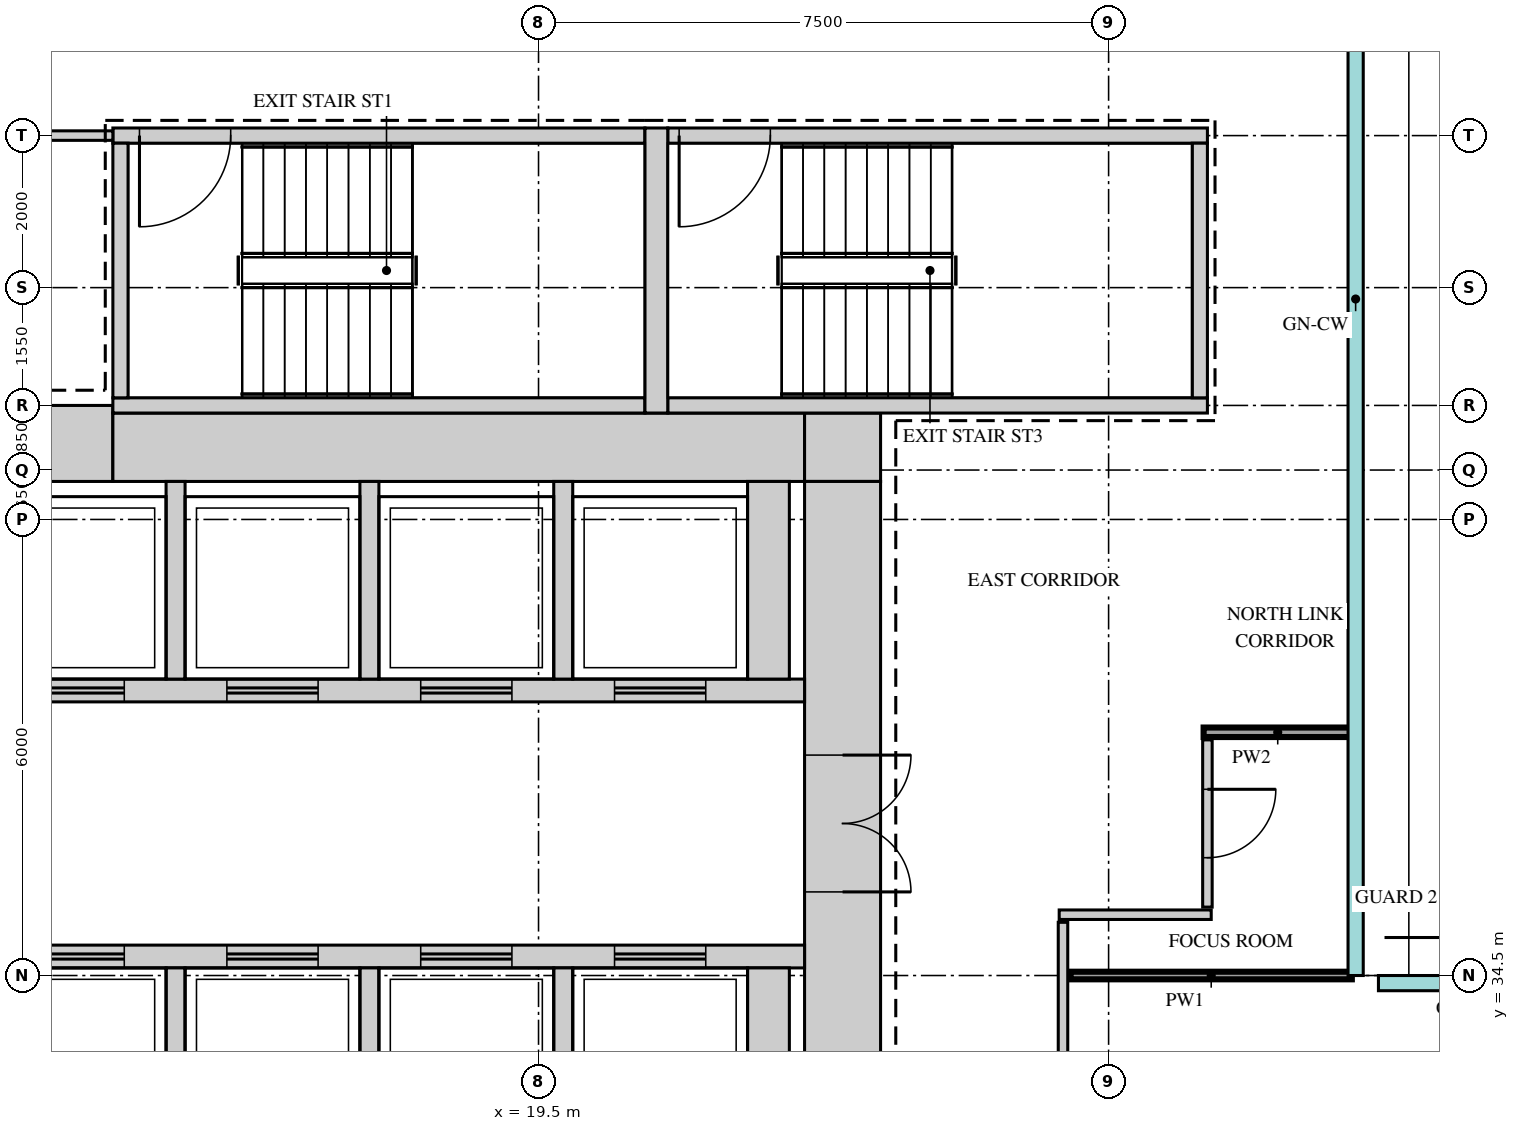
"""IFC4 building model, lengths in metres.
Left out: names, types, materials, properties, quantities, classifications, styles, units other than length and angle.
Written with IfcOpenShell. Run it as: python <this file> out.ifc"""

import sys

from ifc_helpers import new_model, si_unit, direction, frame, frame_2d, origin, place, context, subcontext, project, spatial, rectangle, extrude, source, transform, mapped, element, fill, save


model = new_model("IFC4")
c1 = context("Model", 3, precision=1e-05, world=origin(), true_north=direction((0.0, 1.0)))
c2 = subcontext(c1, "Body", "Model", "MODEL_VIEW")
j1 = project(units=[si_unit("LENGTHUNIT", "METRE"), si_unit("PLANEANGLEUNIT", "RADIAN")], contexts=[c1])
p1 = place(None, origin())
s1 = spatial("IfcSite", under=j1, at=p1, CompositionType="ELEMENT")
p2 = place(p1, origin())
s2 = spatial("IfcBuilding", under=s1, at=p2, CompositionType="ELEMENT")
p3 = place(p2, frame((0.0, 0.0, 158.7)))
s3 = spatial("IfcBuildingStorey", under=s2, at=p3, CompositionType="ELEMENT", Elevation=158.7)
m1 = source(origin(), c2, "Body", "SweptSolid", [
    extrude(rectangle(XDim=6.9, YDim=1.0, at=frame_2d((3.45, 0.0))), origin(), (0.0, 0.0, 1.0), 5.75),
])
p4 = place(p3, frame((7.0, 41.5, 0.0), z_axis=(0.0, 0.0, 1.0), x_axis=(1.0, 0.0, 0.0)))
e1 = element("IfcWall", 1, at=p4, inside=s3, PredefinedType="SHEAR", context=c2, shape_type="MappedRepresentation", body=[
    mapped(m1, transform((0.0, 0.0, 0.0))),
])
m2 = source(origin(), c2, "Body", "SweptSolid", [
    extrude(rectangle(XDim=9.1, YDim=0.9, at=frame_2d((4.55, 0.0))), origin(), (0.0, 0.0, 1.0), 5.75),
])
p5 = place(p3, frame((13.9, 41.45, 0.0), z_axis=(0.0, 0.0, 1.0), x_axis=(1.0, 0.0, 0.0)))
e2 = element("IfcWall", 2, at=p5, inside=s3, PredefinedType="SHEAR", context=c2, shape_type="MappedRepresentation", body=[
    mapped(m2, transform((0.0, 0.0, 0.0))),
])
m3 = source(origin(), c2, "Body", "SweptSolid", [
    extrude(rectangle(XDim=1.0, YDim=0.9, at=frame_2d((0.5, 0.0))), origin(), (0.0, 0.0, 1.0), 5.75),
])
p6 = place(p3, frame((23.0, 41.45, 0.0), z_axis=(0.0, 0.0, 1.0), x_axis=(1.0, 0.0, 0.0)))
e3 = element("IfcWall", 3, at=p6, inside=s3, PredefinedType="SHEAR", context=c2, shape_type="MappedRepresentation", body=[
    mapped(m3, transform((0.0, 0.0, 0.0))),
])
m4 = source(origin(), c2, "Body", "SweptSolid", [
    extrude(rectangle(XDim=28.0, YDim=1.0, at=frame_2d((14.0, 0.0))), origin(), (0.0, 0.0, 1.0), 5.75),
])
p7 = place(p3, frame((23.5, 13.0, 0.0), z_axis=(0.0, 0.0, 1.0), x_axis=(0.0, 1.0, 0.0)))
e4 = element("IfcWall", 4, at=p7, inside=s3, PredefinedType="SHEAR", context=c2, shape_type="MappedRepresentation", body=[
    mapped(m4, transform((0.0, 0.0, 0.0))),
])
m5 = source(origin(), c2, "Body", "SweptSolid", [
    extrude(rectangle(XDim=1.8, YDim=2.1, at=frame_2d((0.9, 1.05))), frame((0.0, 0.51, 0.0), z_axis=(0.0, -1.0, 0.0), x_axis=(1.0, 0.0, 0.0)), (0.0, 0.0, 1.0), 1.02),
])
p8 = place(p7, frame((13.5, 0.0, 0.0)))
e5 = element("IfcOpeningElement", 5, at=p8, cuts=e4, PredefinedType="OPENING", context=c2, shape_type="MappedRepresentation", body=[
    mapped(m5, transform((0.0, 0.0, 0.0))),
])
p9 = place(p7, frame((22.6, 0.0, 0.0)))
e6 = element("IfcOpeningElement", 6, at=p9, cuts=e4, PredefinedType="OPENING", context=c2, shape_type="MappedRepresentation", body=[
    mapped(m5, transform((0.0, 0.0, 0.0))),
])
m6 = source(origin(), c2, "Body", "SweptSolid", [
    extrude(rectangle(XDim=0.9, YDim=2.1, at=frame_2d((0.45, 1.05))), frame((0.0, 0.51, 0.0), z_axis=(0.0, -1.0, 0.0), x_axis=(1.0, 0.0, 0.0)), (0.0, 0.0, 1.0), 1.02),
])
p10 = place(p7, frame((2.15, 0.0, 0.0)))
e7 = element("IfcOpeningElement", 7, at=p10, cuts=e4, PredefinedType="OPENING", context=c2, shape_type="MappedRepresentation", body=[
    mapped(m6, transform((0.0, 0.0, 0.0))),
])
p11 = place(p7, frame((7.0, 0.0, 0.0)))
e8 = element("IfcOpeningElement", 8, at=p11, cuts=e4, PredefinedType="OPENING", context=c2, shape_type="MappedRepresentation", body=[
    mapped(m6, transform((0.0, 0.0, 0.0))),
])
m7 = source(origin(), c2, "Body", "SweptSolid", [
    extrude(rectangle(XDim=7.0, YDim=0.2, at=frame_2d((3.5, 0.0))), origin(), (0.0, 0.0, 1.0), 5.75),
])
p12 = place(p3, frame((13.9, 45.55, 0.0), z_axis=(0.0, 0.0, 1.0), x_axis=(1.0, 0.0, 0.0)))
e9 = element("IfcWall", 9, at=p12, inside=s3, PredefinedType="SHEAR", context=c2, shape_type="MappedRepresentation", body=[
    mapped(m7, transform((0.0, 0.0, 0.0))),
])
m8 = source(origin(), c2, "Body", "SweptSolid", [
    extrude(rectangle(XDim=1.2, YDim=2.1, at=frame_2d((0.6, 1.05))), frame((0.0, 0.11, 0.0), z_axis=(0.0, -1.0, 0.0), x_axis=(1.0, 0.0, 0.0)), (0.0, 0.0, 1.0), 0.22),
])
p13 = place(p12, frame((0.35, 0.0, 0.0)))
e10 = element("IfcOpeningElement", 10, at=p13, cuts=e9, PredefinedType="OPENING", context=c2, shape_type="MappedRepresentation", body=[
    mapped(m8, transform((0.0, 0.0, 0.0))),
])
p14 = place(p3, frame((13.9, 42.0, 0.0), z_axis=(0.0, 0.0, 1.0), x_axis=(1.0, 0.0, 0.0)))
e11 = element("IfcWall", 11, at=p14, inside=s3, PredefinedType="SHEAR", context=c2, shape_type="MappedRepresentation", body=[
    mapped(m7, transform((0.0, 0.0, 0.0))),
])
m9 = source(origin(), c2, "Body", "SweptSolid", [
    extrude(rectangle(XDim=7.1, YDim=0.2, at=frame_2d((3.55, 0.0))), origin(), (0.0, 0.0, 1.0), 5.75),
])
p15 = place(p3, frame((21.2, 45.55, 0.0), z_axis=(0.0, 0.0, 1.0), x_axis=(1.0, 0.0, 0.0)))
e12 = element("IfcWall", 12, at=p15, inside=s3, PredefinedType="SHEAR", context=c2, shape_type="MappedRepresentation", body=[
    mapped(m9, transform((0.0, 0.0, 0.0))),
])
p16 = place(p15, frame((0.15, 0.0, 0.0)))
e13 = element("IfcOpeningElement", 13, at=p16, cuts=e12, PredefinedType="OPENING", context=c2, shape_type="MappedRepresentation", body=[
    mapped(m8, transform((0.0, 0.0, 0.0))),
])
p17 = place(p3, frame((21.2, 42.0, 0.0), z_axis=(0.0, 0.0, 1.0), x_axis=(1.0, 0.0, 0.0)))
e14 = element("IfcWall", 14, at=p17, inside=s3, PredefinedType="SHEAR", context=c2, shape_type="MappedRepresentation", body=[
    mapped(m9, transform((0.0, 0.0, 0.0))),
])
m10 = source(origin(), c2, "Body", "SweptSolid", [
    extrude(rectangle(XDim=3.75, YDim=0.3, at=frame_2d((1.875, 0.0))), origin(), (0.0, 0.0, 1.0), 5.75),
])
p18 = place(p3, frame((21.05, 41.9, 0.0), z_axis=(0.0, 0.0, 1.0), x_axis=(0.0, 1.0, 0.0)))
e15 = element("IfcWall", 15, at=p18, inside=s3, PredefinedType="SHEAR", context=c2, shape_type="MappedRepresentation", body=[
    mapped(m10, transform((0.0, 0.0, 0.0))),
])
m11 = source(origin(), c2, "Body", "SweptSolid", [
    extrude(rectangle(XDim=3.35, YDim=0.2, at=frame_2d((1.675, 0.0))), origin(), (0.0, 0.0, 1.0), 5.75),
])
for number, where, z_axis, x_axis in (
    (16, (14.0, 42.1, 0.0), (0.0, 0.0, 1.0), (0.0, 1.0, 0.0)),
    (17, (28.2, 42.1, 0.0), (0.0, 0.0, 1.0), (0.0, 1.0, 0.0)),
):
    element("IfcWall", number, at=place(p3, frame(where, z_axis=z_axis, x_axis=x_axis)), inside=s3, PredefinedType="SHEAR", context=c2, shape_type="MappedRepresentation", body=[
        mapped(m11, transform((0.0, 0.0, 0.0))),
    ])
m12 = source(origin(), c2, "Body", "SweptSolid", [
    extrude(rectangle(XDim=16.0, YDim=0.3, at=frame_2d((8.0, 0.0))), origin(), (0.0, 0.0, 1.0), 5.75),
])
p19 = place(p3, frame((7.0, 38.25, 0.0), z_axis=(0.0, 0.0, 1.0), x_axis=(1.0, 0.0, 0.0)))
e18 = element("IfcWall", 18, at=p19, inside=s3, PredefinedType="STANDARD", context=c2, shape_type="MappedRepresentation", body=[
    mapped(m12, transform((0.0, 0.0, 0.0))),
])
m13 = source(origin(), c2, "Body", "SweptSolid", [
    extrude(rectangle(XDim=1.2, YDim=2.1, at=frame_2d((0.6, 1.05))), frame((0.0, 0.16, 0.0), z_axis=(0.0, -1.0, 0.0), x_axis=(1.0, 0.0, 0.0)), (0.0, 0.0, 1.0), 0.32),
])
p20 = place(p19, frame((0.75, 0.0, 0.0)))
e19 = element("IfcOpeningElement", 19, at=p20, cuts=e18, PredefinedType="OPENING", context=c2, shape_type="MappedRepresentation", body=[
    mapped(m13, transform((0.0, 0.0, 0.0))),
])
p21 = place(p19, frame((3.3, 0.0, 0.0)))
e20 = element("IfcOpeningElement", 20, at=p21, cuts=e18, PredefinedType="OPENING", context=c2, shape_type="MappedRepresentation", body=[
    mapped(m13, transform((0.0, 0.0, 0.0))),
])
p22 = place(p19, frame((5.85, 0.0, 0.0)))
e21 = element("IfcOpeningElement", 21, at=p22, cuts=e18, PredefinedType="OPENING", context=c2, shape_type="MappedRepresentation", body=[
    mapped(m13, transform((0.0, 0.0, 0.0))),
])
p23 = place(p19, frame((8.4, 0.0, 0.0)))
e22 = element("IfcOpeningElement", 22, at=p23, cuts=e18, PredefinedType="OPENING", context=c2, shape_type="MappedRepresentation", body=[
    mapped(m13, transform((0.0, 0.0, 0.0))),
])
p24 = place(p19, frame((10.95, 0.0, 0.0)))
e23 = element("IfcOpeningElement", 23, at=p24, cuts=e18, PredefinedType="OPENING", context=c2, shape_type="MappedRepresentation", body=[
    mapped(m13, transform((0.0, 0.0, 0.0))),
])
p25 = place(p19, frame((13.5, 0.0, 0.0)))
e24 = element("IfcOpeningElement", 24, at=p25, cuts=e18, PredefinedType="OPENING", context=c2, shape_type="MappedRepresentation", body=[
    mapped(m13, transform((0.0, 0.0, 0.0))),
])
p26 = place(p3, frame((7.0, 34.75, 0.0), z_axis=(0.0, 0.0, 1.0), x_axis=(1.0, 0.0, 0.0)))
e25 = element("IfcWall", 25, at=p26, inside=s3, PredefinedType="STANDARD", context=c2, shape_type="MappedRepresentation", body=[
    mapped(m12, transform((0.0, 0.0, 0.0))),
])
p27 = place(p26, frame((0.75, 0.0, 0.0)))
e26 = element("IfcOpeningElement", 26, at=p27, cuts=e25, PredefinedType="OPENING", context=c2, shape_type="MappedRepresentation", body=[
    mapped(m13, transform((0.0, 0.0, 0.0))),
])
p28 = place(p26, frame((3.3, 0.0, 0.0)))
e27 = element("IfcOpeningElement", 27, at=p28, cuts=e25, PredefinedType="OPENING", context=c2, shape_type="MappedRepresentation", body=[
    mapped(m13, transform((0.0, 0.0, 0.0))),
])
p29 = place(p26, frame((5.85, 0.0, 0.0)))
e28 = element("IfcOpeningElement", 28, at=p29, cuts=e25, PredefinedType="OPENING", context=c2, shape_type="MappedRepresentation", body=[
    mapped(m13, transform((0.0, 0.0, 0.0))),
])
p30 = place(p26, frame((8.4, 0.0, 0.0)))
e29 = element("IfcOpeningElement", 29, at=p30, cuts=e25, PredefinedType="OPENING", context=c2, shape_type="MappedRepresentation", body=[
    mapped(m13, transform((0.0, 0.0, 0.0))),
])
p31 = place(p26, frame((10.95, 0.0, 0.0)))
e30 = element("IfcOpeningElement", 30, at=p31, cuts=e25, PredefinedType="OPENING", context=c2, shape_type="MappedRepresentation", body=[
    mapped(m13, transform((0.0, 0.0, 0.0))),
])
p32 = place(p26, frame((13.5, 0.0, 0.0)))
e31 = element("IfcOpeningElement", 31, at=p32, cuts=e25, PredefinedType="OPENING", context=c2, shape_type="MappedRepresentation", body=[
    mapped(m13, transform((0.0, 0.0, 0.0))),
])
m14 = source(origin(), c2, "Body", "SweptSolid", [
    extrude(rectangle(XDim=2.6, YDim=0.25, at=frame_2d((1.3, 0.0))), origin(), (0.0, 0.0, 1.0), 5.75),
])
for number, where, z_axis, x_axis in (
    (32, (14.725, 38.4, 0.0), (0.0, 0.0, 1.0), (0.0, 1.0, 0.0)),
    (33, (17.275, 38.4, 0.0), (0.0, 0.0, 1.0), (0.0, 1.0, 0.0)),
    (34, (19.825, 38.4, 0.0), (0.0, 0.0, 1.0), (0.0, 1.0, 0.0)),
):
    element("IfcWall", number, at=place(p3, frame(where, z_axis=z_axis, x_axis=x_axis)), inside=s3, PredefinedType="STANDARD", context=c2, shape_type="MappedRepresentation", body=[
        mapped(m14, transform((0.0, 0.0, 0.0))),
    ])
m15 = source(origin(), c2, "Body", "SweptSolid", [
    extrude(rectangle(XDim=2.6, YDim=0.55, at=frame_2d((1.3, 0.0))), origin(), (0.0, 0.0, 1.0), 5.75),
])
p33 = place(p3, frame((22.525, 38.4, 0.0), z_axis=(0.0, 0.0, 1.0), x_axis=(0.0, 1.0, 0.0)))
e35 = element("IfcWall", 35, at=p33, inside=s3, PredefinedType="STANDARD", context=c2, shape_type="MappedRepresentation", body=[
    mapped(m15, transform((0.0, 0.0, 0.0))),
])
m16 = source(origin(), c2, "Body", "SweptSolid", [
    extrude(rectangle(XDim=2.4, YDim=0.25, at=frame_2d((1.2, 0.0))), origin(), (0.0, 0.0, 1.0), 5.75),
])
for number, where, z_axis, x_axis in (
    (36, (14.725, 32.2, 0.0), (0.0, 0.0, 1.0), (0.0, 1.0, 0.0)),
    (37, (17.275, 32.2, 0.0), (0.0, 0.0, 1.0), (0.0, 1.0, 0.0)),
    (38, (19.825, 32.2, 0.0), (0.0, 0.0, 1.0), (0.0, 1.0, 0.0)),
):
    element("IfcWall", number, at=place(p3, frame(where, z_axis=z_axis, x_axis=x_axis)), inside=s3, PredefinedType="STANDARD", context=c2, shape_type="MappedRepresentation", body=[
        mapped(m16, transform((0.0, 0.0, 0.0))),
    ])
m17 = source(origin(), c2, "Body", "SweptSolid", [
    extrude(rectangle(XDim=2.4, YDim=0.55, at=frame_2d((1.2, 0.0))), origin(), (0.0, 0.0, 1.0), 5.75),
])
p34 = place(p3, frame((22.525, 32.2, 0.0), z_axis=(0.0, 0.0, 1.0), x_axis=(0.0, 1.0, 0.0)))
e39 = element("IfcWall", 39, at=p34, inside=s3, PredefinedType="STANDARD", context=c2, shape_type="MappedRepresentation", body=[
    mapped(m17, transform((0.0, 0.0, 0.0))),
])
m18 = source(origin(), c2, "Body", "SweptSolid", [
    extrude(rectangle(XDim=6.9, YDim=0.125, at=frame_2d((3.45, 0.0))), origin(), (0.0, 0.0, 1.0), 5.75),
])
p35 = place(p3, frame((26.4, 28.3, 0.0), z_axis=(0.0, 0.0, 1.0), x_axis=(0.0, 1.0, 0.0)))
e40 = element("IfcWall", 40, at=p35, inside=s3, PredefinedType="PARTITIONING", context=c2, shape_type="MappedRepresentation", body=[
    mapped(m18, transform((0.0, 0.0, 0.0))),
])
m19 = source(origin(), c2, "Body", "SweptSolid", [
    extrude(rectangle(XDim=3.7, YDim=0.1, at=frame_2d((1.85, 0.0))), origin(), (0.0, 0.0, 1.0), 5.75),
])
p36 = place(p3, frame((26.5, 34.5, 0.0), z_axis=(0.0, 0.0, 1.0), x_axis=(1.0, 0.0, 0.0)))
e41 = element("IfcWall", 41, at=p36, inside=s3, PredefinedType="PARTITIONING", context=c2, shape_type="MappedRepresentation", body=[
    mapped(m19, transform((0.0, 0.0, 0.0))),
])
m20 = source(origin(), c2, "Body", "SweptSolid", [
    extrude(rectangle(XDim=2.0, YDim=0.125, at=frame_2d((1.0, 0.0))), origin(), (0.0, 0.0, 1.0), 5.75),
])
p37 = place(p3, frame((26.35, 35.3, 0.0), z_axis=(0.0, 0.0, 1.0), x_axis=(1.0, 0.0, 0.0)))
e42 = element("IfcWall", 42, at=p37, inside=s3, PredefinedType="PARTITIONING", context=c2, shape_type="MappedRepresentation", body=[
    mapped(m20, transform((0.0, 0.0, 0.0))),
])
m21 = source(origin(), c2, "Body", "SweptSolid", [
    extrude(rectangle(XDim=2.2, YDim=0.125, at=frame_2d((1.1, 0.0))), origin(), (0.0, 0.0, 1.0), 5.75),
])
p38 = place(p3, frame((28.3, 35.4, 0.0), z_axis=(0.0, 0.0, 1.0), x_axis=(0.0, 1.0, 0.0)))
e43 = element("IfcWall", 43, at=p38, inside=s3, PredefinedType="PARTITIONING", context=c2, shape_type="MappedRepresentation", body=[
    mapped(m21, transform((0.0, 0.0, 0.0))),
])
m22 = source(origin(), c2, "Body", "SweptSolid", [
    extrude(rectangle(XDim=0.9, YDim=2.1, at=frame_2d((0.45, 1.05))), frame((0.0, 0.073, 0.0), z_axis=(0.0, -1.0, 0.0), x_axis=(1.0, 0.0, 0.0)), (0.0, 0.0, 1.0), 0.145),
])
p39 = place(p38, frame((0.65, 0.0, 0.0)))
e44 = element("IfcOpeningElement", 44, at=p39, cuts=e43, PredefinedType="OPENING", context=c2, shape_type="MappedRepresentation", body=[
    mapped(m22, transform((0.0, 0.0, 0.0))),
])
m23 = source(origin(), c2, "Body", "SweptSolid", [
    extrude(rectangle(XDim=1.95, YDim=0.125, at=frame_2d((0.975, 0.0))), origin(), (0.0, 0.0, 1.0), 5.75),
])
p40 = place(p3, frame((28.25, 37.7, 0.0), z_axis=(0.0, 0.0, 1.0), x_axis=(1.0, 0.0, 0.0)))
e45 = element("IfcWall", 45, at=p40, inside=s3, PredefinedType="PARTITIONING", context=c2, shape_type="MappedRepresentation", body=[
    mapped(m23, transform((0.0, 0.0, 0.0))),
])
m24 = source(origin(), c2, "Body", "SweptSolid", [
    extrude(rectangle(XDim=7.95, YDim=0.125, at=frame_2d((3.975, 0.0))), origin(), (0.0, 0.0, 1.0), 5.75),
])
p41 = place(p3, frame((5.95, 45.55, 0.0), z_axis=(0.0, 0.0, 1.0), x_axis=(1.0, 0.0, 0.0)))
e46 = element("IfcWall", 46, at=p41, inside=s3, PredefinedType="PARTITIONING", context=c2, shape_type="MappedRepresentation", body=[
    mapped(m24, transform((0.0, 0.0, 0.0))),
])
p42 = place(p41, frame((3.55, 0.0, 0.0)))
e47 = element("IfcOpeningElement", 47, at=p42, cuts=e46, PredefinedType="OPENING", context=c2, shape_type="MappedRepresentation", body=[
    mapped(m22, transform((0.0, 0.0, 0.0))),
])
m25 = source(origin(), c2, "Body", "SweptSolid", [
    extrude(rectangle(XDim=1.8, YDim=2.1, at=frame_2d((0.9, 1.05))), frame((0.0, 0.45, 0.0), z_axis=(0.0, -1.0, 0.0), x_axis=(1.0, 0.0, 0.0)), (0.0, 0.0, 1.0), 0.9),
])
p43 = place(p9, origin())
e48 = element("IfcDoor", 48, at=p43, inside=s3, OperationType="DOUBLE_DOOR_SINGLE_SWING", PredefinedType="DOOR", context=c2, shape_type="MappedRepresentation", body=[
    mapped(m25, transform((0.0, 0.0, 0.0))),
])
fill(e6, e48)
m26 = source(origin(), c2, "Body", "SweptSolid", [
    extrude(rectangle(XDim=0.9, YDim=2.1, at=frame_2d((0.45, 1.05))), frame((0.0, 0.025, 0.0), z_axis=(0.0, -1.0, 0.0), x_axis=(1.0, 0.0, 0.0)), (0.0, 0.0, 1.0), 0.05),
])
p44 = place(p39, origin())
e49 = element("IfcDoor", 49, at=p44, inside=s3, OperationType="SINGLE_SWING_RIGHT", PredefinedType="DOOR", context=c2, shape_type="MappedRepresentation", body=[
    mapped(m26, transform((0.0, 0.0, 0.0))),
])
fill(e44, e49)
m27 = source(origin(), c2, "Body", "SweptSolid", [
    extrude(rectangle(XDim=1.2, YDim=2.1, at=frame_2d((0.6, 1.05))), frame((0.0, 0.025, 0.0), z_axis=(0.0, -1.0, 0.0), x_axis=(1.0, 0.0, 0.0)), (0.0, 0.0, 1.0), 0.05),
])
p45 = place(p13, origin())
e50 = element("IfcDoor", 50, at=p45, inside=s3, OperationType="SINGLE_SWING_LEFT", PredefinedType="DOOR", context=c2, shape_type="MappedRepresentation", body=[
    mapped(m27, transform((0.0, 0.0, 0.0))),
])
fill(e10, e50)
p46 = place(p16, origin())
e51 = element("IfcDoor", 51, at=p46, inside=s3, OperationType="SINGLE_SWING_LEFT", PredefinedType="DOOR", context=c2, shape_type="MappedRepresentation", body=[
    mapped(m27, transform((0.0, 0.0, 0.0))),
])
fill(e13, e51)
p47 = place(p29, origin())
e52 = element("IfcDoor", 52, at=p47, inside=s3, OperationType="DOUBLE_DOOR_SLIDING", PredefinedType="DOOR", context=c2, shape_type="MappedRepresentation", body=[
    mapped(m27, transform((0.0, 0.0, 0.0))),
])
fill(e28, e52)
p48 = place(p30, origin())
e53 = element("IfcDoor", 53, at=p48, inside=s3, OperationType="DOUBLE_DOOR_SLIDING", PredefinedType="DOOR", context=c2, shape_type="MappedRepresentation", body=[
    mapped(m27, transform((0.0, 0.0, 0.0))),
])
fill(e29, e53)
p49 = place(p31, origin())
e54 = element("IfcDoor", 54, at=p49, inside=s3, OperationType="DOUBLE_DOOR_SLIDING", PredefinedType="DOOR", context=c2, shape_type="MappedRepresentation", body=[
    mapped(m27, transform((0.0, 0.0, 0.0))),
])
fill(e30, e54)
p50 = place(p32, origin())
e55 = element("IfcDoor", 55, at=p50, inside=s3, OperationType="DOUBLE_DOOR_SLIDING", PredefinedType="DOOR", context=c2, shape_type="MappedRepresentation", body=[
    mapped(m27, transform((0.0, 0.0, 0.0))),
])
fill(e31, e55)
p51 = place(p22, origin())
e56 = element("IfcDoor", 56, at=p51, inside=s3, OperationType="DOUBLE_DOOR_SLIDING", PredefinedType="DOOR", context=c2, shape_type="MappedRepresentation", body=[
    mapped(m27, transform((0.0, 0.0, 0.0))),
])
fill(e21, e56)
p52 = place(p23, origin())
e57 = element("IfcDoor", 57, at=p52, inside=s3, OperationType="DOUBLE_DOOR_SLIDING", PredefinedType="DOOR", context=c2, shape_type="MappedRepresentation", body=[
    mapped(m27, transform((0.0, 0.0, 0.0))),
])
fill(e22, e57)
p53 = place(p24, origin())
e58 = element("IfcDoor", 58, at=p53, inside=s3, OperationType="DOUBLE_DOOR_SLIDING", PredefinedType="DOOR", context=c2, shape_type="MappedRepresentation", body=[
    mapped(m27, transform((0.0, 0.0, 0.0))),
])
fill(e23, e58)
p54 = place(p25, origin())
e59 = element("IfcDoor", 59, at=p54, inside=s3, OperationType="DOUBLE_DOOR_SLIDING", PredefinedType="DOOR", context=c2, shape_type="MappedRepresentation", body=[
    mapped(m27, transform((0.0, 0.0, 0.0))),
])
fill(e24, e59)
save(model, sys.argv[1])
